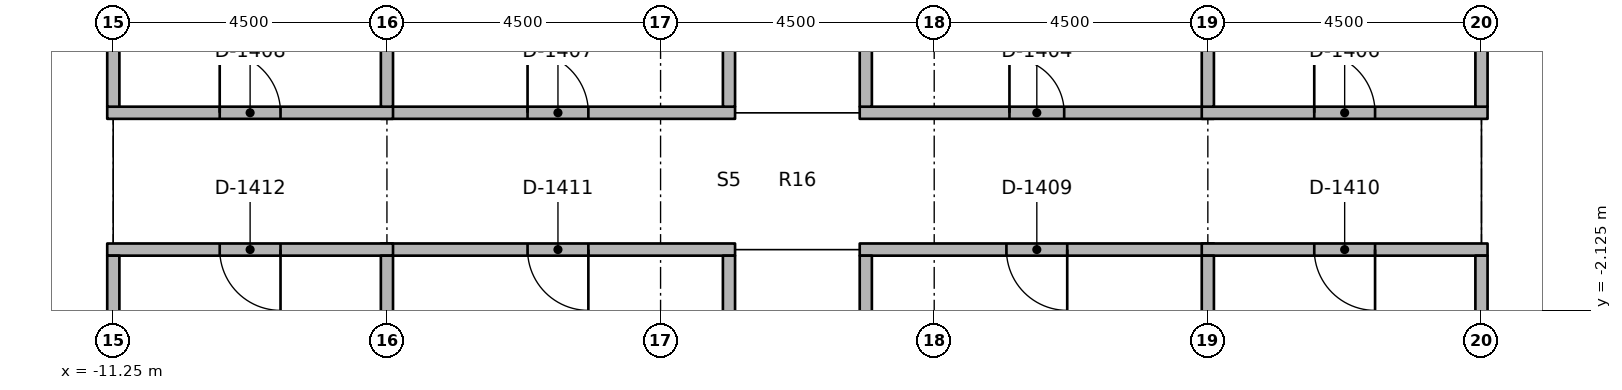
"""IFC4 building model, lengths in metres.
Left out: names, types, materials, properties, quantities, classifications, styles, units other than length and angle.
Written with IfcOpenShell. Run it as: python <this file> out.ifc"""

import sys

from ifc_helpers import new_model, si_unit, direction, frame, frame_2d, origin, place, context, subcontext, project, spatial, rectangle, extrude, element, fill, save


model = new_model("IFC4")
c1 = context("Model", 3, precision=1e-05, world=origin(), true_north=direction((0.0, 1.0)))
c2 = subcontext(c1, "Body", "Model", "MODEL_VIEW")
j1 = project(units=[si_unit("LENGTHUNIT", "METRE"), si_unit("PLANEANGLEUNIT", "RADIAN")], contexts=[c1])
p1 = place(None, origin())
s1 = spatial("IfcSite", under=j1, at=p1, CompositionType="ELEMENT")
p2 = place(p1, origin())
s2 = spatial("IfcBuilding", under=s1, at=p2, CompositionType="ELEMENT")
p3 = place(p2, frame((0.0, 0.0, 141.0)))
s3 = spatial("IfcBuildingStorey", under=s2, at=p3, CompositionType="ELEMENT", Elevation=141.0)
p4 = place(p3, frame((1.025, 1.125, 0.0), z_axis=(0.0, 0.0, 1.0), x_axis=(1.0, 0.0, 0.0)))
e1 = element("IfcWall", 1, at=p4, inside=s3, PredefinedType="PARTITIONING", context=c2, shape_type="SweptSolid", body=[
    extrude(rectangle(XDim=5.825, YDim=0.2, at=frame_2d((2.913, 0.0))), origin(), (0.0, 0.0, 1.0), 2.75),
])
p5 = place(p4, frame((2.462, 0.0, 0.0)))
e2 = element("IfcOpeningElement", 2, at=p5, cuts=e1, PredefinedType="OPENING", context=c2, shape_type="SweptSolid", body=[
    extrude(rectangle(XDim=0.9, YDim=2.1, at=frame_2d((0.45, 1.05))), frame((0.0, 0.11, 0.0), z_axis=(0.0, -1.0, 0.0), x_axis=(1.0, 0.0, 0.0)), (0.0, 0.0, 1.0), 0.22),
])
p6 = place(p3, frame((6.65, 1.125, 0.0), z_axis=(0.0, 0.0, 1.0), x_axis=(1.0, 0.0, 0.0)))
e3 = element("IfcWall", 3, at=p6, inside=s3, PredefinedType="PARTITIONING", context=c2, shape_type="SweptSolid", body=[
    extrude(rectangle(XDim=4.7, YDim=0.2, at=frame_2d((2.35, 0.0))), origin(), (0.0, 0.0, 1.0), 2.75),
])
p7 = place(p6, frame((1.85, 0.0, 0.0)))
e4 = element("IfcOpeningElement", 4, at=p7, cuts=e3, PredefinedType="OPENING", context=c2, shape_type="SweptSolid", body=[
    extrude(rectangle(XDim=1.0, YDim=2.1, at=frame_2d((0.5, 1.05))), frame((0.0, 0.11, 0.0), z_axis=(0.0, -1.0, 0.0), x_axis=(1.0, 0.0, 0.0)), (0.0, 0.0, 1.0), 0.22),
])
p8 = place(p3, frame((-6.85, 1.125, 0.0), z_axis=(0.0, 0.0, 1.0), x_axis=(1.0, 0.0, 0.0)))
e5 = element("IfcWall", 5, at=p8, inside=s3, PredefinedType="PARTITIONING", context=c2, shape_type="SweptSolid", body=[
    extrude(rectangle(XDim=5.825, YDim=0.2, at=frame_2d((2.913, 0.0))), origin(), (0.0, 0.0, 1.0), 2.75),
])
p9 = place(p8, frame((2.413, 0.0, 0.0)))
e6 = element("IfcOpeningElement", 6, at=p9, cuts=e5, PredefinedType="OPENING", context=c2, shape_type="SweptSolid", body=[
    extrude(rectangle(XDim=1.0, YDim=2.1, at=frame_2d((0.5, 1.05))), frame((0.0, 0.11, 0.0), z_axis=(0.0, -1.0, 0.0), x_axis=(1.0, 0.0, 0.0)), (0.0, 0.0, 1.0), 0.22),
])
p10 = place(p3, frame((-11.35, 1.125, 0.0), z_axis=(0.0, 0.0, 1.0), x_axis=(1.0, 0.0, 0.0)))
e7 = element("IfcWall", 7, at=p10, inside=s3, PredefinedType="PARTITIONING", context=c2, shape_type="SweptSolid", body=[
    extrude(rectangle(XDim=4.7, YDim=0.2, at=frame_2d((2.35, 0.0))), origin(), (0.0, 0.0, 1.0), 2.75),
])
p11 = place(p10, frame((1.85, 0.0, 0.0)))
e8 = element("IfcOpeningElement", 8, at=p11, cuts=e7, PredefinedType="OPENING", context=c2, shape_type="SweptSolid", body=[
    extrude(rectangle(XDim=1.0, YDim=2.1, at=frame_2d((0.5, 1.05))), frame((0.0, 0.11, 0.0), z_axis=(0.0, -1.0, 0.0), x_axis=(1.0, 0.0, 0.0)), (0.0, 0.0, 1.0), 0.22),
])
p12 = place(p3, frame((6.85, -1.125, 0.0), z_axis=(0.0, 0.0, 1.0), x_axis=(-1.0, 0.0, 0.0)))
e9 = element("IfcWall", 9, at=p12, inside=s3, PredefinedType="PARTITIONING", context=c2, shape_type="SweptSolid", body=[
    extrude(rectangle(XDim=5.825, YDim=0.2, at=frame_2d((2.913, 0.0))), origin(), (0.0, 0.0, 1.0), 2.75),
])
p13 = place(p12, frame((2.413, 0.0, 0.0)))
e10 = element("IfcOpeningElement", 10, at=p13, cuts=e9, PredefinedType="OPENING", context=c2, shape_type="SweptSolid", body=[
    extrude(rectangle(XDim=1.0, YDim=2.1, at=frame_2d((0.5, 1.05))), frame((0.0, 0.11, 0.0), z_axis=(0.0, -1.0, 0.0), x_axis=(1.0, 0.0, 0.0)), (0.0, 0.0, 1.0), 0.22),
])
p14 = place(p3, frame((11.35, -1.125, 0.0), z_axis=(0.0, 0.0, 1.0), x_axis=(-1.0, 0.0, 0.0)))
e11 = element("IfcWall", 11, at=p14, inside=s3, PredefinedType="PARTITIONING", context=c2, shape_type="SweptSolid", body=[
    extrude(rectangle(XDim=4.7, YDim=0.2, at=frame_2d((2.35, 0.0))), origin(), (0.0, 0.0, 1.0), 2.75),
])
p15 = place(p14, frame((1.85, 0.0, 0.0)))
e12 = element("IfcOpeningElement", 12, at=p15, cuts=e11, PredefinedType="OPENING", context=c2, shape_type="SweptSolid", body=[
    extrude(rectangle(XDim=1.0, YDim=2.1, at=frame_2d((0.5, 1.05))), frame((0.0, 0.11, 0.0), z_axis=(0.0, -1.0, 0.0), x_axis=(1.0, 0.0, 0.0)), (0.0, 0.0, 1.0), 0.22),
])
p16 = place(p3, frame((-1.025, -1.125, 0.0), z_axis=(0.0, 0.0, 1.0), x_axis=(-1.0, 0.0, 0.0)))
e13 = element("IfcWall", 13, at=p16, inside=s3, PredefinedType="PARTITIONING", context=c2, shape_type="SweptSolid", body=[
    extrude(rectangle(XDim=5.825, YDim=0.2, at=frame_2d((2.913, 0.0))), origin(), (0.0, 0.0, 1.0), 2.75),
])
p17 = place(p16, frame((2.413, 0.0, 0.0)))
e14 = element("IfcOpeningElement", 14, at=p17, cuts=e13, PredefinedType="OPENING", context=c2, shape_type="SweptSolid", body=[
    extrude(rectangle(XDim=1.0, YDim=2.1, at=frame_2d((0.5, 1.05))), frame((0.0, 0.11, 0.0), z_axis=(0.0, -1.0, 0.0), x_axis=(1.0, 0.0, 0.0)), (0.0, 0.0, 1.0), 0.22),
])
p18 = place(p3, frame((-6.65, -1.125, 0.0), z_axis=(0.0, 0.0, 1.0), x_axis=(-1.0, 0.0, 0.0)))
e15 = element("IfcWall", 15, at=p18, inside=s3, PredefinedType="PARTITIONING", context=c2, shape_type="SweptSolid", body=[
    extrude(rectangle(XDim=4.7, YDim=0.2, at=frame_2d((2.35, 0.0))), origin(), (0.0, 0.0, 1.0), 2.75),
])
p19 = place(p18, frame((1.85, 0.0, 0.0)))
e16 = element("IfcOpeningElement", 16, at=p19, cuts=e15, PredefinedType="OPENING", context=c2, shape_type="SweptSolid", body=[
    extrude(rectangle(XDim=1.0, YDim=2.1, at=frame_2d((0.5, 1.05))), frame((0.0, 0.11, 0.0), z_axis=(0.0, -1.0, 0.0), x_axis=(1.0, 0.0, 0.0)), (0.0, 0.0, 1.0), 0.22),
])
p20 = place(p3, frame((1.125, 1.225, 0.0), z_axis=(0.0, 0.0, 1.0), x_axis=(0.0, 1.0, 0.0)))
e17 = element("IfcWall", 17, at=p20, inside=s3, PredefinedType="PARTITIONING", context=c2, shape_type="SweptSolid", body=[
    extrude(rectangle(XDim=2.675, YDim=0.2, at=frame_2d((1.337, 0.0))), origin(), (0.0, 0.0, 1.0), 2.75),
])
for number, where, z_axis, x_axis in (
    (18, (-1.125, 1.225, 0.0), (0.0, 0.0, 1.0), (0.0, 1.0, 0.0)),
    (19, (1.125, -6.65, 0.0), (0.0, 0.0, 1.0), (0.0, 1.0, 0.0)),
    (20, (-1.125, -6.65, 0.0), (0.0, 0.0, 1.0), (0.0, 1.0, 0.0)),
):
    element("IfcWall", number, at=place(p3, frame(where, z_axis=z_axis, x_axis=x_axis)), inside=s3, PredefinedType="PARTITIONING", context=c2, shape_type="SweptSolid", body=[
        extrude(rectangle(XDim=5.425, YDim=0.2, at=frame_2d((2.712, 0.0))), origin(), (0.0, 0.0, 1.0), 2.75),
    ])
p21 = place(p3, frame((6.75, 1.225, 0.0), z_axis=(0.0, 0.0, 1.0), x_axis=(0.0, 1.0, 0.0)))
e21 = element("IfcWall", 21, at=p21, inside=s3, PredefinedType="PARTITIONING", context=c2, shape_type="SweptSolid", body=[
    extrude(rectangle(XDim=2.675, YDim=0.2, at=frame_2d((1.337, 0.0))), origin(), (0.0, 0.0, 1.0), 2.75),
])
p22 = place(p3, frame((11.25, 1.225, 0.0), z_axis=(0.0, 0.0, 1.0), x_axis=(0.0, 1.0, 0.0)))
e22 = element("IfcWall", 22, at=p22, inside=s3, PredefinedType="PARTITIONING", context=c2, shape_type="SweptSolid", body=[
    extrude(rectangle(XDim=0.925, YDim=0.2, at=frame_2d((0.462, 0.0))), origin(), (0.0, 0.0, 1.0), 2.75),
])
p23 = place(p3, frame((-6.75, 1.225, 0.0), z_axis=(0.0, 0.0, 1.0), x_axis=(0.0, 1.0, 0.0)))
e23 = element("IfcWall", 23, at=p23, inside=s3, PredefinedType="PARTITIONING", context=c2, shape_type="SweptSolid", body=[
    extrude(rectangle(XDim=5.425, YDim=0.2, at=frame_2d((2.712, 0.0))), origin(), (0.0, 0.0, 1.0), 2.75),
])
p24 = place(p3, frame((-11.25, 1.225, 0.0), z_axis=(0.0, 0.0, 1.0), x_axis=(0.0, 1.0, 0.0)))
e24 = element("IfcWall", 24, at=p24, inside=s3, PredefinedType="PARTITIONING", context=c2, shape_type="SweptSolid", body=[
    extrude(rectangle(XDim=4.945, YDim=0.2, at=frame_2d((2.472, 0.0))), origin(), (0.0, 0.0, 1.0), 2.75),
])
p25 = place(p3, frame((6.75, -6.65, 0.0), z_axis=(0.0, 0.0, 1.0), x_axis=(0.0, 1.0, 0.0)))
e25 = element("IfcWall", 25, at=p25, inside=s3, PredefinedType="PARTITIONING", context=c2, shape_type="SweptSolid", body=[
    extrude(rectangle(XDim=5.425, YDim=0.2, at=frame_2d((2.712, 0.0))), origin(), (0.0, 0.0, 1.0), 2.75),
])
p26 = place(p3, frame((11.25, -2.15, 0.0), z_axis=(0.0, 0.0, 1.0), x_axis=(0.0, 1.0, 0.0)))
e26 = element("IfcWall", 26, at=p26, inside=s3, PredefinedType="PARTITIONING", context=c2, shape_type="SweptSolid", body=[
    extrude(rectangle(XDim=0.925, YDim=0.2, at=frame_2d((0.462, 0.0))), origin(), (0.0, 0.0, 1.0), 2.75),
])
for number, where, z_axis, x_axis in (
    (27, (-6.75, -6.65, 0.0), (0.0, 0.0, 1.0), (0.0, 1.0, 0.0)),
    (28, (-11.25, -6.65, 0.0), (0.0, 0.0, 1.0), (0.0, 1.0, 0.0)),
):
    element("IfcWall", number, at=place(p3, frame(where, z_axis=z_axis, x_axis=x_axis)), inside=s3, PredefinedType="PARTITIONING", context=c2, shape_type="SweptSolid", body=[
        extrude(rectangle(XDim=5.425, YDim=0.2, at=frame_2d((2.712, 0.0))), origin(), (0.0, 0.0, 1.0), 2.75),
    ])
p27 = place(p5, origin())
e29 = element("IfcDoor", 29, at=p27, inside=s3, OperationType="SINGLE_SWING_RIGHT", PredefinedType="DOOR", context=c2, shape_type="SweptSolid", body=[
    extrude(rectangle(XDim=0.9, YDim=2.1, at=frame_2d((0.45, 1.05))), frame((0.0, 0.025, 0.0), z_axis=(0.0, -1.0, 0.0), x_axis=(1.0, 0.0, 0.0)), (0.0, 0.0, 1.0), 0.05),
])
fill(e2, e29)
p28 = place(p7, origin())
e30 = element("IfcDoor", 30, at=p28, inside=s3, OperationType="SINGLE_SWING_RIGHT", PredefinedType="DOOR", context=c2, shape_type="SweptSolid", body=[
    extrude(rectangle(XDim=1.0, YDim=2.1, at=frame_2d((0.5, 1.05))), frame((0.0, 0.025, 0.0), z_axis=(0.0, -1.0, 0.0), x_axis=(1.0, 0.0, 0.0)), (0.0, 0.0, 1.0), 0.05),
])
fill(e4, e30)
p29 = place(p9, origin())
e31 = element("IfcDoor", 31, at=p29, inside=s3, OperationType="SINGLE_SWING_RIGHT", PredefinedType="DOOR", context=c2, shape_type="SweptSolid", body=[
    extrude(rectangle(XDim=1.0, YDim=2.1, at=frame_2d((0.5, 1.05))), frame((0.0, 0.025, 0.0), z_axis=(0.0, -1.0, 0.0), x_axis=(1.0, 0.0, 0.0)), (0.0, 0.0, 1.0), 0.05),
])
fill(e6, e31)
p30 = place(p11, origin())
e32 = element("IfcDoor", 32, at=p30, inside=s3, OperationType="SINGLE_SWING_RIGHT", PredefinedType="DOOR", context=c2, shape_type="SweptSolid", body=[
    extrude(rectangle(XDim=1.0, YDim=2.1, at=frame_2d((0.5, 1.05))), frame((0.0, 0.025, 0.0), z_axis=(0.0, -1.0, 0.0), x_axis=(1.0, 0.0, 0.0)), (0.0, 0.0, 1.0), 0.05),
])
fill(e8, e32)
p31 = place(p13, origin())
e33 = element("IfcDoor", 33, at=p31, inside=s3, OperationType="SINGLE_SWING_RIGHT", PredefinedType="DOOR", context=c2, shape_type="SweptSolid", body=[
    extrude(rectangle(XDim=1.0, YDim=2.1, at=frame_2d((0.5, 1.05))), frame((0.0, 0.025, 0.0), z_axis=(0.0, -1.0, 0.0), x_axis=(1.0, 0.0, 0.0)), (0.0, 0.0, 1.0), 0.05),
])
fill(e10, e33)
p32 = place(p15, origin())
e34 = element("IfcDoor", 34, at=p32, inside=s3, OperationType="SINGLE_SWING_RIGHT", PredefinedType="DOOR", context=c2, shape_type="SweptSolid", body=[
    extrude(rectangle(XDim=1.0, YDim=2.1, at=frame_2d((0.5, 1.05))), frame((0.0, 0.025, 0.0), z_axis=(0.0, -1.0, 0.0), x_axis=(1.0, 0.0, 0.0)), (0.0, 0.0, 1.0), 0.05),
])
fill(e12, e34)
p33 = place(p17, origin())
e35 = element("IfcDoor", 35, at=p33, inside=s3, OperationType="SINGLE_SWING_RIGHT", PredefinedType="DOOR", context=c2, shape_type="SweptSolid", body=[
    extrude(rectangle(XDim=1.0, YDim=2.1, at=frame_2d((0.5, 1.05))), frame((0.0, 0.025, 0.0), z_axis=(0.0, -1.0, 0.0), x_axis=(1.0, 0.0, 0.0)), (0.0, 0.0, 1.0), 0.05),
])
fill(e14, e35)
p34 = place(p19, origin())
e36 = element("IfcDoor", 36, at=p34, inside=s3, OperationType="SINGLE_SWING_RIGHT", PredefinedType="DOOR", context=c2, shape_type="SweptSolid", body=[
    extrude(rectangle(XDim=1.0, YDim=2.1, at=frame_2d((0.5, 1.05))), frame((0.0, 0.025, 0.0), z_axis=(0.0, -1.0, 0.0), x_axis=(1.0, 0.0, 0.0)), (0.0, 0.0, 1.0), 0.05),
])
fill(e16, e36)
save(model, sys.argv[1])
